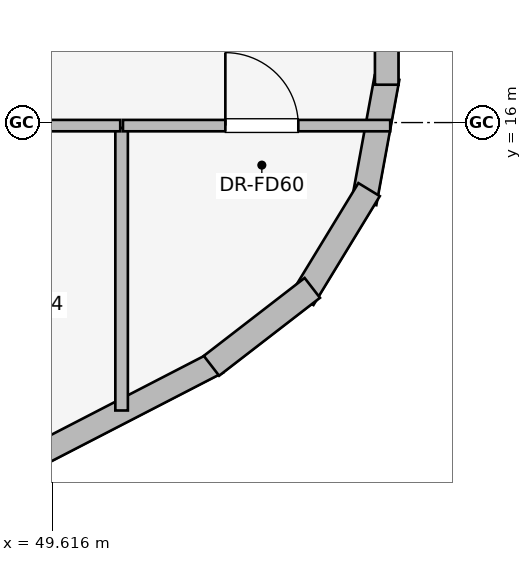
"""IFC4 building model, lengths in metres.
Left out: names, types, materials, properties, quantities, classifications, styles, units other than length and angle.
Written with IfcOpenShell. Run it as: python <this file> out.ifc"""

import sys

from ifc_helpers import new_model, si_unit, direction, frame, frame_2d, origin, place, context, subcontext, project, spatial, rectangle, extrude, element, fill, save


model = new_model("IFC4")
c1 = context("Model", 3, precision=1e-05, world=origin(), true_north=direction((0.0, 1.0)))
c2 = subcontext(c1, "Body", "Model", "MODEL_VIEW")
j1 = project(units=[si_unit("LENGTHUNIT", "METRE"), si_unit("PLANEANGLEUNIT", "RADIAN")], contexts=[c1])
p1 = place(None, origin())
s1 = spatial("IfcSite", under=j1, at=p1, CompositionType="ELEMENT")
p2 = place(p1, origin())
s2 = spatial("IfcBuilding", under=s1, at=p2, CompositionType="ELEMENT")
p3 = place(p2, frame((0.0, 0.0, 187.8)))
s3 = spatial("IfcBuildingStorey", under=s2, at=p3, CompositionType="ELEMENT", Elevation=187.8)
p4 = place(p3, frame((51.792, 12.847, 0.0), z_axis=(0.0, 0.0, 1.0), x_axis=(-0.888626188278, -0.458632202867, 0.0)))
e1 = element("IfcWall", 1, at=p4, inside=s3, PredefinedType="STANDARD", context=c2, shape_type="SweptSolid", body=[
    extrude(rectangle(XDim=16.828, YDim=0.31, at=frame_2d((8.414, 0.0))), origin(), (0.0, 0.0, 1.0), 3.14),
])
p5 = place(p4, frame((4.09, 0.0, 0.75)))
e2 = element("IfcOpeningElement", 2, at=p5, cuts=e1, PredefinedType="OPENING", context=c2, shape_type="SweptSolid", body=[
    extrude(rectangle(XDim=1.05, YDim=1.4, at=frame_2d((0.525, 0.7))), frame((0.0, 0.165, 0.0), z_axis=(0.0, -1.0, 0.0), x_axis=(1.0, 0.0, 0.0)), (0.0, 0.0, 1.0), 0.33),
])
p6 = place(p4, frame((6.582, 0.0, 0.75)))
e3 = element("IfcOpeningElement", 3, at=p6, cuts=e1, PredefinedType="OPENING", context=c2, shape_type="SweptSolid", body=[
    extrude(rectangle(XDim=1.35, YDim=1.45, at=frame_2d((0.675, 0.725))), frame((0.0, 0.165, 0.0), z_axis=(0.0, -1.0, 0.0), x_axis=(1.0, 0.0, 0.0)), (0.0, 0.0, 1.0), 0.33),
])
p7 = place(p4, frame((9.051, 0.0, 0.75)))
e4 = element("IfcOpeningElement", 4, at=p7, cuts=e1, PredefinedType="OPENING", context=c2, shape_type="SweptSolid", body=[
    extrude(rectangle(XDim=1.35, YDim=1.45, at=frame_2d((0.675, 0.725))), frame((0.0, 0.165, 0.0), z_axis=(0.0, -1.0, 0.0), x_axis=(1.0, 0.0, 0.0)), (0.0, 0.0, 1.0), 0.33),
])
p8 = place(p4, frame((11.766, 0.0, 0.75)))
e5 = element("IfcOpeningElement", 5, at=p8, cuts=e1, PredefinedType="OPENING", context=c2, shape_type="SweptSolid", body=[
    extrude(rectangle(XDim=1.05, YDim=1.4, at=frame_2d((0.525, 0.7))), frame((0.0, 0.165, 0.0), z_axis=(0.0, -1.0, 0.0), x_axis=(1.0, 0.0, 0.0)), (0.0, 0.0, 1.0), 0.33),
])
p9 = place(p4, frame((14.413, 0.0, 0.75)))
e6 = element("IfcOpeningElement", 6, at=p9, cuts=e1, PredefinedType="OPENING", context=c2, shape_type="SweptSolid", body=[
    extrude(rectangle(XDim=1.35, YDim=1.45, at=frame_2d((0.675, 0.725))), frame((0.0, 0.165, 0.0), z_axis=(0.0, -1.0, 0.0), x_axis=(1.0, 0.0, 0.0)), (0.0, 0.0, 1.0), 0.33),
])
p10 = place(p3, frame((54.021, 16.592, 0.0), z_axis=(0.0, 0.0, 1.0), x_axis=(-0.180717642671, -0.983535019014, 0.0)))
e7 = element("IfcWall", 7, at=p10, inside=s3, PredefinedType="STANDARD", context=c2, shape_type="SweptSolid", body=[
    extrude(rectangle(XDim=1.677, YDim=0.33, at=frame_2d((0.838, 0.0))), origin(), (0.0, 0.0, 1.0), 3.14),
])
p11 = place(p3, frame((53.785, 15.118, 0.0), z_axis=(0.0, 0.0, 1.0), x_axis=(-0.520219286058, -0.85403272444, 0.0)))
e8 = element("IfcWall", 8, at=p11, inside=s3, PredefinedType="STANDARD", context=c2, shape_type="SweptSolid", body=[
    extrude(rectangle(XDim=1.678, YDim=0.33, at=frame_2d((0.839, 0.0))), origin(), (0.0, 0.0, 1.0), 3.14),
])
p12 = place(p3, frame((53.038, 13.825, 0.0), z_axis=(0.0, 0.0, 1.0), x_axis=(-0.791464279355, -0.611215423976, 0.0)))
e9 = element("IfcWall", 9, at=p12, inside=s3, PredefinedType="STANDARD", context=c2, shape_type="SweptSolid", body=[
    extrude(rectangle(XDim=1.677, YDim=0.33, at=frame_2d((0.838, 0.0))), origin(), (0.0, 0.0, 1.0), 3.14),
])
p13 = place(p3, frame((54.017, 31.502, 0.0), z_axis=(0.0, 0.0, 1.0), x_axis=(0.0, -1.0, 0.0)))
e10 = element("IfcWall", 10, at=p13, inside=s3, PredefinedType="STANDARD", context=c2, shape_type="SweptSolid", body=[
    extrude(rectangle(XDim=15.004, YDim=0.31, at=frame_2d((7.502, 0.0))), origin(), (0.0, 0.0, 1.0), 3.14),
])
p14 = place(p13, frame((4.353, 0.0, 0.75)))
e11 = element("IfcOpeningElement", 11, at=p14, cuts=e10, PredefinedType="OPENING", context=c2, shape_type="SweptSolid", body=[
    extrude(rectangle(XDim=2.0, YDim=1.5, at=frame_2d((1.0, 0.75))), frame((0.0, 0.165, 0.0), z_axis=(0.0, -1.0, 0.0), x_axis=(1.0, 0.0, 0.0)), (0.0, 0.0, 1.0), 0.33),
])
p15 = place(p13, frame((8.083, 0.0, 0.75)))
e12 = element("IfcOpeningElement", 12, at=p15, cuts=e10, PredefinedType="OPENING", context=c2, shape_type="SweptSolid", body=[
    extrude(rectangle(XDim=1.35, YDim=1.45, at=frame_2d((0.675, 0.725))), frame((0.0, 0.165, 0.0), z_axis=(0.0, -1.0, 0.0), x_axis=(1.0, 0.0, 0.0)), (0.0, 0.0, 1.0), 0.33),
])
p16 = place(p13, frame((9.87, 0.0, 0.75)))
e13 = element("IfcOpeningElement", 13, at=p16, cuts=e10, PredefinedType="OPENING", context=c2, shape_type="SweptSolid", body=[
    extrude(rectangle(XDim=1.35, YDim=1.45, at=frame_2d((0.675, 0.725))), frame((0.0, 0.165, 0.0), z_axis=(0.0, -1.0, 0.0), x_axis=(1.0, 0.0, 0.0)), (0.0, 0.0, 1.0), 0.33),
])
p17 = place(p3, frame((50.529, 12.212, 0.0), z_axis=(0.0, 0.0, 1.0), x_axis=(0.0, 1.0, 0.0)))
e14 = element("IfcWall", 14, at=p17, inside=s3, PredefinedType="PARTITIONING", context=c2, shape_type="SweptSolid", body=[
    extrude(rectangle(XDim=3.718, YDim=0.165, at=frame_2d((1.859, 0.0))), origin(), (0.0, 0.0, 1.0), 3.14),
])
p18 = place(p3, frame((46.773, 15.96, 0.0), z_axis=(0.0, 0.0, 1.0), x_axis=(1.0, 0.0, 0.0)))
e15 = element("IfcWall", 15, at=p18, inside=s3, PredefinedType="PARTITIONING", context=c2, shape_type="SweptSolid", body=[
    extrude(rectangle(XDim=3.738, YDim=0.15, at=frame_2d((1.869, 0.0))), origin(), (0.0, 0.0, 1.0), 3.14),
])
p19 = place(p18, frame((1.389, 0.0, 0.0)))
e16 = element("IfcOpeningElement", 16, at=p19, cuts=e15, PredefinedType="OPENING", context=c2, shape_type="SweptSolid", body=[
    extrude(rectangle(XDim=0.96, YDim=2.0, at=frame_2d((0.48, 1.0))), frame((0.0, 0.085, 0.0), z_axis=(0.0, -1.0, 0.0), x_axis=(1.0, 0.0, 0.0)), (0.0, 0.0, 1.0), 0.17),
])
p20 = place(p3, frame((50.547, 15.96, 0.0), z_axis=(0.0, 0.0, 1.0), x_axis=(1.0, 0.0, 0.0)))
e17 = element("IfcWall", 17, at=p20, inside=s3, PredefinedType="PARTITIONING", context=c2, shape_type="SweptSolid", body=[
    extrude(rectangle(XDim=3.516, YDim=0.15, at=frame_2d((1.758, 0.0))), origin(), (0.0, 0.0, 1.0), 3.14),
])
p21 = place(p20, frame((1.347, 0.0, 0.0)))
e18 = element("IfcOpeningElement", 18, at=p21, cuts=e17, PredefinedType="OPENING", context=c2, shape_type="SweptSolid", body=[
    extrude(rectangle(XDim=0.96, YDim=2.0, at=frame_2d((0.48, 1.0))), frame((0.0, 0.085, 0.0), z_axis=(0.0, -1.0, 0.0), x_axis=(1.0, 0.0, 0.0)), (0.0, 0.0, 1.0), 0.17),
])
p22 = place(p21, origin())
e19 = element("IfcDoor", 19, at=p22, inside=s3, OperationType="SINGLE_SWING_LEFT", PredefinedType="DOOR", context=c2, shape_type="SweptSolid", body=[
    extrude(rectangle(XDim=0.96, YDim=2.0, at=frame_2d((0.48, 1.0))), frame((0.0, 0.025, 0.0), z_axis=(0.0, -1.0, 0.0), x_axis=(1.0, 0.0, 0.0)), (0.0, 0.0, 1.0), 0.05),
])
fill(e18, e19)
save(model, sys.argv[1])
